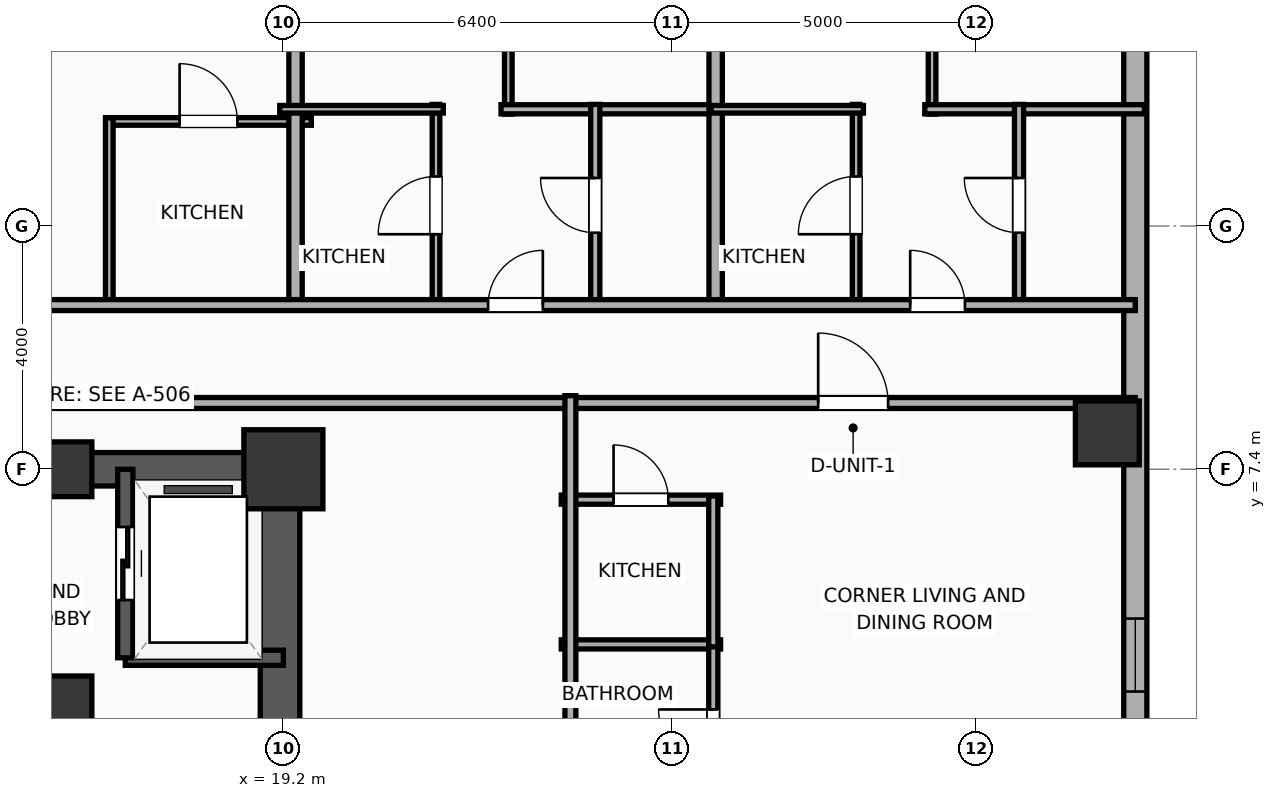
"""IFC4 building model, lengths in metres.
Left out: names, types, materials, properties, quantities, classifications, styles, units other than length and angle.
Written with IfcOpenShell. Run it as: python <this file> out.ifc"""

import sys

from ifc_helpers import new_model, si_unit, direction, frame, frame_2d, origin, origin_2d, place, context, subcontext, project, spatial, rectangle, hollow_rectangle, extrude, element, fill, save


model = new_model("IFC4")
c1 = context("Model", 3, precision=1e-05, world=origin(), true_north=direction((0.0, 1.0)))
c2 = subcontext(c1, "Body", "Model", "MODEL_VIEW")
j1 = project(units=[si_unit("LENGTHUNIT", "METRE"), si_unit("PLANEANGLEUNIT", "RADIAN")], contexts=[c1])
p1 = place(None, origin())
s1 = spatial("IfcSite", under=j1, at=p1, CompositionType="ELEMENT")
p2 = place(p1, origin())
s2 = spatial("IfcBuilding", under=s1, at=p2, CompositionType="ELEMENT")
p3 = place(p2, frame((0.0, 0.0, 101.4)))
s3 = spatial("IfcBuildingStorey", under=s2, at=p3, CompositionType="ELEMENT", Elevation=101.4)
for number, where, z_axis, x_axis in (
    (1, (15.6, 3.55, 0.0), (0.0, 0.0, 1.0), (1.0, 0.0, 0.0)),
    (2, (15.6, 7.4, 0.0), (0.0, 0.0, 1.0), (1.0, 0.0, 0.0)),
):
    element("IfcColumn", number, at=place(p3, frame(where, z_axis=z_axis, x_axis=x_axis)), inside=s3, PredefinedType="COLUMN", context=c2, shape_type="SweptSolid", body=[
        extrude(rectangle(XDim=0.9, YDim=0.9, at=origin_2d()), origin(), (0.0, 0.0, 1.0), 3.9),
    ])
p4 = place(p3, frame((19.2, 7.4, 0.0), z_axis=(0.0, 0.0, 1.0), x_axis=(1.0, 0.0, 0.0)))
e3 = element("IfcColumn", 3, at=p4, inside=s3, PredefinedType="COLUMN", context=c2, shape_type="SweptSolid", body=[
    extrude(rectangle(XDim=1.3, YDim=1.3, at=origin_2d()), origin(), (0.0, 0.0, 1.0), 3.9),
])
p5 = place(p3, frame((12.125, 7.4, 0.0), z_axis=(0.0, 0.0, 1.0), x_axis=(1.0, 0.0, 0.0)))
e4 = element("IfcWall", 4, at=p5, inside=s3, PredefinedType="SHEAR", context=c2, shape_type="SweptSolid", body=[
    extrude(rectangle(XDim=7.35, YDim=0.55, at=frame_2d((3.675, 0.0))), origin(), (0.0, 0.0, 1.0), 3.65),
])
p6 = place(p3, frame((19.145, -7.4, 0.0), z_axis=(0.0, 0.0, 1.0), x_axis=(0.0, 1.0, 0.0)))
e5 = element("IfcWall", 5, at=p6, inside=s3, PredefinedType="SHEAR", context=c2, shape_type="SweptSolid", body=[
    extrude(rectangle(XDim=14.8, YDim=0.65, at=frame_2d((7.4, 0.0))), origin(), (0.0, 0.0, 1.0), 3.65),
])
p7 = place(p3, frame((32.75, 7.998, 0.0), z_axis=(0.0, 0.0, 1.0), x_axis=(1.0, 0.0, 0.0)))
e6 = element("IfcColumn", 6, at=p7, inside=s3, PredefinedType="COLUMN", context=c2, shape_type="SweptSolid", body=[
    extrude(hollow_rectangle(XDim=1.05, YDim=1.05, WallThickness=0.036, at=origin_2d()), origin(), (0.0, 0.0, 1.0), 3.9),
])
p8 = place(p3, frame((33.21, 17.781, 0.0), z_axis=(0.0, 0.0, 1.0), x_axis=(0.0, -1.0, 0.0)))
e7 = element("IfcWall", 7, at=p8, inside=s3, PredefinedType="ELEMENTEDWALL", context=c2, shape_type="SweptSolid", body=[
    extrude(rectangle(XDim=34.363, YDim=0.38, at=frame_2d((17.181, 0.0))), origin(), (0.0, 0.0, 1.0), 3.65),
])
p9 = place(p8, frame((12.836, 0.0, 0.75)))
e8 = element("IfcOpeningElement", 8, at=p9, cuts=e7, PredefinedType="OPENING", context=c2, shape_type="SweptSolid", body=[
    extrude(rectangle(XDim=1.2, YDim=2.05, at=frame_2d((0.6, 1.025))), frame((0.0, 0.2, 0.0), z_axis=(0.0, -1.0, 0.0), x_axis=(1.0, 0.0, 0.0)), (0.0, 0.0, 1.0), 0.4),
])
p10 = place(p8, frame((21.386, 0.0, 0.75)))
e9 = element("IfcOpeningElement", 9, at=p10, cuts=e7, PredefinedType="OPENING", context=c2, shape_type="SweptSolid", body=[
    extrude(rectangle(XDim=1.2, YDim=2.05, at=frame_2d((0.6, 1.025))), frame((0.0, 0.2, 0.0), z_axis=(0.0, -1.0, 0.0), x_axis=(1.0, 0.0, 0.0)), (0.0, 0.0, 1.0), 0.4),
])
p11 = place(p3, frame((16.6, 4.3, 0.0), z_axis=(0.0, 0.0, 1.0), x_axis=(1.0, 0.0, 0.0)))
e10 = element("IfcWall", 10, at=p11, inside=s3, PredefinedType="SOLIDWALL", context=c2, shape_type="SweptSolid", body=[
    extrude(rectangle(XDim=2.6, YDim=0.25, at=frame_2d((1.3, 0.0))), origin(), (0.0, 0.0, 1.0), 3.65),
])
p12 = place(p3, frame((16.6, 7.4, 0.0), z_axis=(0.0, 0.0, 1.0), x_axis=(0.0, -1.0, 0.0)))
e11 = element("IfcWall", 11, at=p12, inside=s3, PredefinedType="SOLIDWALL", context=c2, shape_type="SweptSolid", body=[
    extrude(rectangle(XDim=3.1, YDim=0.25, at=frame_2d((1.55, 0.0))), origin(), (0.0, 0.0, 1.0), 3.65),
])
p13 = place(p12, frame((0.95, 0.0, 0.0)))
e12 = element("IfcOpeningElement", 12, at=p13, cuts=e11, PredefinedType="OPENING", context=c2, shape_type="SweptSolid", body=[
    extrude(rectangle(XDim=1.2, YDim=2.05, at=frame_2d((0.6, 1.025))), frame((0.0, 0.135, 0.0), z_axis=(0.0, -1.0, 0.0), x_axis=(1.0, 0.0, 0.0)), (0.0, 0.0, 1.0), 0.27),
])
p14 = place(p3, frame((9.88, 8.49, 0.0), z_axis=(0.0, 0.0, 1.0), x_axis=(1.0, 0.0, 0.0)))
e13 = element("IfcWall", 13, at=p14, inside=s3, PredefinedType="PARTITIONING", context=c2, shape_type="SweptSolid", body=[
    extrude(rectangle(XDim=23.33, YDim=0.18, at=frame_2d((11.665, 0.0))), origin(), (0.0, 0.0, 1.0), 3.65),
])
p15 = place(p14, frame((18.115, 0.0, 0.0)))
e14 = element("IfcOpeningElement", 14, at=p15, cuts=e13, PredefinedType="OPENING", context=c2, shape_type="SweptSolid", body=[
    extrude(rectangle(XDim=1.15, YDim=2.05, at=frame_2d((0.575, 1.025))), frame((0.0, 0.1, 0.0), z_axis=(0.0, -1.0, 0.0), x_axis=(1.0, 0.0, 0.0)), (0.0, 0.0, 1.0), 0.2),
])
p16 = place(p3, frame((16.277, 13.12, 0.0), z_axis=(0.0, 0.0, 1.0), x_axis=(1.0, 0.0, 0.0)))
e15 = element("IfcWall", 15, at=p16, inside=s3, PredefinedType="PARTITIONING", context=c2, shape_type="SweptSolid", body=[
    extrude(rectangle(XDim=3.383, YDim=0.125, at=frame_2d((1.691, 0.0))), origin(), (0.0, 0.0, 1.0), 3.65),
])
p17 = place(p16, frame((1.217, 0.0, 0.0)))
e16 = element("IfcOpeningElement", 16, at=p17, cuts=e15, PredefinedType="OPENING", context=c2, shape_type="SweptSolid", body=[
    extrude(rectangle(XDim=0.95, YDim=2.05, at=frame_2d((0.475, 1.025))), frame((0.0, 0.073, 0.0), z_axis=(0.0, -1.0, 0.0), x_axis=(1.0, 0.0, 0.0)), (0.0, 0.0, 1.0), 0.145),
])
p18 = place(p3, frame((16.337, 10.08, 0.0), z_axis=(0.0, 0.0, 1.0), x_axis=(0.0, 1.0, 0.0)))
e17 = element("IfcWall", 17, at=p18, inside=s3, PredefinedType="PARTITIONING", context=c2, shape_type="SweptSolid", body=[
    extrude(rectangle(XDim=3.1, YDim=0.125, at=frame_2d((1.55, 0.0))), origin(), (0.0, 0.0, 1.0), 3.65),
])
p19 = place(p3, frame((19.4, 10.02, 0.0), z_axis=(0.0, 0.0, 1.0), x_axis=(0.0, 1.0, 0.0)))
e18 = element("IfcWall", 18, at=p19, inside=s3, PredefinedType="PARTITIONING", context=c2, shape_type="SweptSolid", body=[
    extrude(rectangle(XDim=11.59, YDim=0.22, at=frame_2d((5.795, 0.0))), origin(), (0.0, 0.0, 1.0), 3.65),
])
p20 = place(p3, frame((22.899, 13.24, 0.0), z_axis=(0.0, 0.0, 1.0), x_axis=(0.0, 1.0, 0.0)))
e19 = element("IfcWall", 19, at=p20, inside=s3, PredefinedType="PARTITIONING", context=c2, shape_type="SweptSolid", body=[
    extrude(rectangle(XDim=8.52, YDim=0.125, at=frame_2d((4.26, 0.0))), origin(), (0.0, 0.0, 1.0), 3.65),
])
p21 = place(p20, frame((1.595, 0.0, 0.0)))
e20 = element("IfcOpeningElement", 20, at=p21, cuts=e19, PredefinedType="OPENING", context=c2, shape_type="SweptSolid", body=[
    extrude(rectangle(XDim=0.9, YDim=2.05, at=frame_2d((0.45, 1.025))), frame((0.0, 0.073, 0.0), z_axis=(0.0, -1.0, 0.0), x_axis=(1.0, 0.0, 0.0)), (0.0, 0.0, 1.0), 0.145),
])
p22 = place(p3, frame((22.779, 13.32, 0.0), z_axis=(0.0, 0.0, 1.0), x_axis=(1.0, 0.0, 0.0)))
e21 = element("IfcWall", 21, at=p22, inside=s3, PredefinedType="PLUMBINGWALL", context=c2, shape_type="SweptSolid", body=[
    extrude(rectangle(XDim=3.605, YDim=0.15, at=frame_2d((1.802, 0.0))), origin(), (0.0, 0.0, 1.0), 3.65),
])
p23 = place(p3, frame((21.71, 10.08, 0.0), z_axis=(0.0, 0.0, 1.0), x_axis=(0.0, 1.0, 0.0)))
e22 = element("IfcWall", 22, at=p23, inside=s3, PredefinedType="PARTITIONING", context=c2, shape_type="SweptSolid", body=[
    extrude(rectangle(XDim=3.32, YDim=0.125, at=frame_2d((1.66, 0.0))), origin(), (0.0, 0.0, 1.0), 3.65),
])
p24 = place(p23, frame((1.185, 0.0, 0.0)))
e23 = element("IfcOpeningElement", 23, at=p24, cuts=e22, PredefinedType="OPENING", context=c2, shape_type="SweptSolid", body=[
    extrude(rectangle(XDim=0.95, YDim=2.05, at=frame_2d((0.475, 1.025))), frame((0.0, 0.073, 0.0), z_axis=(0.0, -1.0, 0.0), x_axis=(1.0, 0.0, 0.0)), (0.0, 0.0, 1.0), 0.145),
])
p25 = place(p3, frame((19.14, 13.32, 0.0), z_axis=(0.0, 0.0, 1.0), x_axis=(1.0, 0.0, 0.0)))
e24 = element("IfcWall", 24, at=p25, inside=s3, PredefinedType="PARTITIONING", context=c2, shape_type="SweptSolid", body=[
    extrude(rectangle(XDim=2.69, YDim=0.125, at=frame_2d((1.345, 0.0))), origin(), (0.0, 0.0, 1.0), 3.65),
])
p26 = place(p3, frame((24.329, 10.08, 0.0), z_axis=(0.0, 0.0, 1.0), x_axis=(0.0, 1.0, 0.0)))
e25 = element("IfcWall", 25, at=p26, inside=s3, PredefinedType="PLUMBINGWALL", context=c2, shape_type="SweptSolid", body=[
    extrude(rectangle(XDim=3.32, YDim=0.15, at=frame_2d((1.66, 0.0))), origin(), (0.0, 0.0, 1.0), 3.65),
])
p27 = place(p26, frame((1.21, 0.0, 0.0)))
e26 = element("IfcOpeningElement", 26, at=p27, cuts=e25, PredefinedType="OPENING", context=c2, shape_type="SweptSolid", body=[
    extrude(rectangle(XDim=0.9, YDim=2.05, at=frame_2d((0.45, 1.025))), frame((0.0, 0.085, 0.0), z_axis=(0.0, -1.0, 0.0), x_axis=(1.0, 0.0, 0.0)), (0.0, 0.0, 1.0), 0.17),
])
p28 = place(p3, frame((26.309, 10.02, 0.0), z_axis=(0.0, 0.0, 1.0), x_axis=(0.0, 1.0, 0.0)))
e27 = element("IfcWall", 27, at=p28, inside=s3, PredefinedType="PARTITIONING", context=c2, shape_type="SweptSolid", body=[
    extrude(rectangle(XDim=11.59, YDim=0.22, at=frame_2d((5.795, 0.0))), origin(), (0.0, 0.0, 1.0), 3.65),
])
p29 = place(p3, frame((29.868, 13.24, 0.0), z_axis=(0.0, 0.0, 1.0), x_axis=(0.0, 1.0, 0.0)))
e28 = element("IfcWall", 28, at=p29, inside=s3, PredefinedType="PARTITIONING", context=c2, shape_type="SweptSolid", body=[
    extrude(rectangle(XDim=8.426, YDim=0.125, at=frame_2d((4.213, 0.0))), origin(), (0.0, 0.0, 1.0), 3.65),
])
p30 = place(p29, frame((1.572, 0.0, 0.0)))
e29 = element("IfcOpeningElement", 29, at=p30, cuts=e28, PredefinedType="OPENING", context=c2, shape_type="SweptSolid", body=[
    extrude(rectangle(XDim=0.9, YDim=2.05, at=frame_2d((0.45, 1.025))), frame((0.0, 0.073, 0.0), z_axis=(0.0, -1.0, 0.0), x_axis=(1.0, 0.0, 0.0)), (0.0, 0.0, 1.0), 0.145),
])
p31 = place(p3, frame((29.748, 13.32, 0.0), z_axis=(0.0, 0.0, 1.0), x_axis=(1.0, 0.0, 0.0)))
e30 = element("IfcWall", 30, at=p31, inside=s3, PredefinedType="PLUMBINGWALL", context=c2, shape_type="SweptSolid", body=[
    extrude(rectangle(XDim=3.612, YDim=0.15, at=frame_2d((1.806, 0.0))), origin(), (0.0, 0.0, 1.0), 3.65),
])
p32 = place(p3, frame((28.619, 10.08, 0.0), z_axis=(0.0, 0.0, 1.0), x_axis=(0.0, 1.0, 0.0)))
e31 = element("IfcWall", 31, at=p32, inside=s3, PredefinedType="PARTITIONING", context=c2, shape_type="SweptSolid", body=[
    extrude(rectangle(XDim=3.32, YDim=0.125, at=frame_2d((1.66, 0.0))), origin(), (0.0, 0.0, 1.0), 3.65),
])
p33 = place(p32, frame((1.185, 0.0, 0.0)))
e32 = element("IfcOpeningElement", 32, at=p33, cuts=e31, PredefinedType="OPENING", context=c2, shape_type="SweptSolid", body=[
    extrude(rectangle(XDim=0.95, YDim=2.05, at=frame_2d((0.475, 1.025))), frame((0.0, 0.073, 0.0), z_axis=(0.0, -1.0, 0.0), x_axis=(1.0, 0.0, 0.0)), (0.0, 0.0, 1.0), 0.145),
])
p34 = place(p3, frame((26.234, 13.32, 0.0), z_axis=(0.0, 0.0, 1.0), x_axis=(1.0, 0.0, 0.0)))
e33 = element("IfcWall", 33, at=p34, inside=s3, PredefinedType="PARTITIONING", context=c2, shape_type="SweptSolid", body=[
    extrude(rectangle(XDim=2.505, YDim=0.125, at=frame_2d((1.252, 0.0))), origin(), (0.0, 0.0, 1.0), 3.65),
])
p35 = place(p3, frame((31.298, 10.08, 0.0), z_axis=(0.0, 0.0, 1.0), x_axis=(0.0, 1.0, 0.0)))
e34 = element("IfcWall", 34, at=p35, inside=s3, PredefinedType="PLUMBINGWALL", context=c2, shape_type="SweptSolid", body=[
    extrude(rectangle(XDim=3.32, YDim=0.15, at=frame_2d((1.66, 0.0))), origin(), (0.0, 0.0, 1.0), 3.65),
])
p36 = place(p35, frame((1.21, 0.0, 0.0)))
e35 = element("IfcOpeningElement", 35, at=p36, cuts=e34, PredefinedType="OPENING", context=c2, shape_type="SweptSolid", body=[
    extrude(rectangle(XDim=0.9, YDim=2.05, at=frame_2d((0.45, 1.025))), frame((0.0, 0.085, 0.0), z_axis=(0.0, -1.0, 0.0), x_axis=(1.0, 0.0, 0.0)), (0.0, 0.0, 1.0), 0.17),
])
p37 = place(p3, frame((-29.21, 10.1, 0.0), z_axis=(0.0, 0.0, 1.0), x_axis=(1.0, 0.0, 0.0)))
e36 = element("IfcWall", 36, at=p37, inside=s3, PredefinedType="PARTITIONING", context=c2, shape_type="SweptSolid", body=[
    extrude(rectangle(XDim=62.42, YDim=0.18, at=frame_2d((31.21, 0.0))), origin(), (0.0, 0.0, 1.0), 3.65),
])
p38 = place(p37, frame((4.906, 0.0, 0.0)))
e37 = element("IfcOpeningElement", 37, at=p38, cuts=e36, PredefinedType="OPENING", context=c2, shape_type="SweptSolid", body=[
    extrude(rectangle(XDim=1.15, YDim=2.05, at=frame_2d((0.575, 1.025))), frame((0.0, 0.1, 0.0), z_axis=(0.0, -1.0, 0.0), x_axis=(1.0, 0.0, 0.0)), (0.0, 0.0, 1.0), 0.2),
])
p39 = place(p37, frame((14.812, 0.0, 0.0)))
e38 = element("IfcOpeningElement", 38, at=p39, cuts=e36, PredefinedType="OPENING", context=c2, shape_type="SweptSolid", body=[
    extrude(rectangle(XDim=1.15, YDim=2.05, at=frame_2d((0.575, 1.025))), frame((0.0, 0.1, 0.0), z_axis=(0.0, -1.0, 0.0), x_axis=(1.0, 0.0, 0.0)), (0.0, 0.0, 1.0), 0.2),
])
p40 = place(p37, frame((24.406, 0.0, 0.0)))
e39 = element("IfcOpeningElement", 39, at=p40, cuts=e36, PredefinedType="OPENING", context=c2, shape_type="SweptSolid", body=[
    extrude(rectangle(XDim=1.15, YDim=2.05, at=frame_2d((0.575, 1.025))), frame((0.0, 0.1, 0.0), z_axis=(0.0, -1.0, 0.0), x_axis=(1.0, 0.0, 0.0)), (0.0, 0.0, 1.0), 0.2),
])
p41 = place(p37, frame((33.981, 0.0, 0.0)))
e40 = element("IfcOpeningElement", 40, at=p41, cuts=e36, PredefinedType="OPENING", context=c2, shape_type="SweptSolid", body=[
    extrude(rectangle(XDim=1.15, YDim=2.05, at=frame_2d((0.575, 1.025))), frame((0.0, 0.1, 0.0), z_axis=(0.0, -1.0, 0.0), x_axis=(1.0, 0.0, 0.0)), (0.0, 0.0, 1.0), 0.2),
])
p42 = place(p37, frame((43.138, 0.0, 0.0)))
e41 = element("IfcOpeningElement", 41, at=p42, cuts=e36, PredefinedType="OPENING", context=c2, shape_type="SweptSolid", body=[
    extrude(rectangle(XDim=1.15, YDim=2.05, at=frame_2d((0.575, 1.025))), frame((0.0, 0.1, 0.0), z_axis=(0.0, -1.0, 0.0), x_axis=(1.0, 0.0, 0.0)), (0.0, 0.0, 1.0), 0.2),
])
p43 = place(p37, frame((51.777, 0.0, 0.0)))
e42 = element("IfcOpeningElement", 42, at=p43, cuts=e36, PredefinedType="OPENING", context=c2, shape_type="SweptSolid", body=[
    extrude(rectangle(XDim=0.9, YDim=2.05, at=frame_2d((0.45, 1.025))), frame((0.0, 0.1, 0.0), z_axis=(0.0, -1.0, 0.0), x_axis=(1.0, 0.0, 0.0)), (0.0, 0.0, 1.0), 0.2),
])
p44 = place(p37, frame((58.718, 0.0, 0.0)))
e43 = element("IfcOpeningElement", 43, at=p44, cuts=e36, PredefinedType="OPENING", context=c2, shape_type="SweptSolid", body=[
    extrude(rectangle(XDim=0.9, YDim=2.05, at=frame_2d((0.45, 1.025))), frame((0.0, 0.1, 0.0), z_axis=(0.0, -1.0, 0.0), x_axis=(1.0, 0.0, 0.0)), (0.0, 0.0, 1.0), 0.2),
])
p45 = place(p3, frame((23.77, 6.9, 0.0), z_axis=(0.0, 0.0, 1.0), x_axis=(1.0, 0.0, 0.0)))
e44 = element("IfcWall", 44, at=p45, inside=s3, PredefinedType="PLUMBINGWALL", context=c2, shape_type="SweptSolid", body=[
    extrude(rectangle(XDim=2.62, YDim=0.15, at=frame_2d((1.31, 0.0))), origin(), (0.0, 0.0, 1.0), 3.65),
])
p46 = place(p45, frame((0.86, 0.0, 0.0)))
e45 = element("IfcOpeningElement", 45, at=p46, cuts=e44, PredefinedType="OPENING", context=c2, shape_type="SweptSolid", body=[
    extrude(rectangle(XDim=0.9, YDim=2.05, at=frame_2d((0.45, 1.025))), frame((0.0, 0.085, 0.0), z_axis=(0.0, -1.0, 0.0), x_axis=(1.0, 0.0, 0.0)), (0.0, 0.0, 1.0), 0.17),
])
p47 = place(p3, frame((23.77, 4.52, 0.0), z_axis=(0.0, 0.0, 1.0), x_axis=(1.0, 0.0, 0.0)))
e46 = element("IfcWall", 46, at=p47, inside=s3, PredefinedType="PLUMBINGWALL", context=c2, shape_type="SweptSolid", body=[
    extrude(rectangle(XDim=2.62, YDim=0.15, at=frame_2d((1.31, 0.0))), origin(), (0.0, 0.0, 1.0), 3.65),
])
p48 = place(p3, frame((26.27, 1.44, 0.0), z_axis=(0.0, 0.0, 1.0), x_axis=(0.0, 1.0, 0.0)))
e47 = element("IfcWall", 47, at=p48, inside=s3, PredefinedType="PLUMBINGWALL", context=c2, shape_type="SweptSolid", body=[
    extrude(rectangle(XDim=3.12, YDim=0.15, at=frame_2d((1.56, 0.0))), origin(), (0.0, 0.0, 1.0), 3.65),
])
p49 = place(p48, frame((1.11, 0.0, 0.0)))
e48 = element("IfcOpeningElement", 48, at=p49, cuts=e47, PredefinedType="OPENING", context=c2, shape_type="SweptSolid", body=[
    extrude(rectangle(XDim=0.9, YDim=2.05, at=frame_2d((0.45, 1.025))), frame((0.0, 0.085, 0.0), z_axis=(0.0, -1.0, 0.0), x_axis=(1.0, 0.0, 0.0)), (0.0, 0.0, 1.0), 0.17),
])
p50 = place(p3, frame((26.27, 4.48, 0.0), z_axis=(0.0, 0.0, 1.0), x_axis=(0.0, 1.0, 0.0)))
e49 = element("IfcWall", 49, at=p50, inside=s3, PredefinedType="PLUMBINGWALL", context=c2, shape_type="SweptSolid", body=[
    extrude(rectangle(XDim=2.48, YDim=0.15, at=frame_2d((1.24, 0.0))), origin(), (0.0, 0.0, 1.0), 3.65),
])
p51 = place(p3, frame((23.92, -8.61, 0.0), z_axis=(0.0, 0.0, 1.0), x_axis=(0.0, 1.0, 0.0)))
e50 = element("IfcWall", 50, at=p51, inside=s3, PredefinedType="PARTITIONING", context=c2, shape_type="SweptSolid", body=[
    extrude(rectangle(XDim=17.22, YDim=0.18, at=frame_2d((8.61, 0.0))), origin(), (0.0, 0.0, 1.0), 3.65),
])
p52 = place(p9, origin())
e51 = element("IfcWindow", 51, at=p52, inside=s3, PartitioningType="SINGLE_PANEL", PredefinedType="WINDOW", context=c2, shape_type="SweptSolid", body=[
    extrude(rectangle(XDim=1.2, YDim=2.05, at=frame_2d((0.6, 1.025))), frame((0.0, 0.03, 0.0), z_axis=(0.0, -1.0, 0.0), x_axis=(1.0, 0.0, 0.0)), (0.0, 0.0, 1.0), 0.06),
])
fill(e8, e51)
p53 = place(p13, origin())
e52 = element("IfcDoor", 52, at=p53, inside=s3, OperationType="SLIDING_TO_LEFT", PredefinedType="DOOR", context=c2, shape_type="SweptSolid", body=[
    extrude(rectangle(XDim=1.2, YDim=2.05, at=frame_2d((0.6, 1.025))), frame((0.0, 0.025, 0.0), z_axis=(0.0, -1.0, 0.0), x_axis=(1.0, 0.0, 0.0)), (0.0, 0.0, 1.0), 0.05),
])
fill(e12, e52)
p54 = place(p15, origin())
e53 = element("IfcDoor", 53, at=p54, inside=s3, OperationType="SINGLE_SWING_LEFT", PredefinedType="DOOR", context=c2, shape_type="SweptSolid", body=[
    extrude(rectangle(XDim=1.15, YDim=2.05, at=frame_2d((0.575, 1.025))), frame((0.0, 0.025, 0.0), z_axis=(0.0, -1.0, 0.0), x_axis=(1.0, 0.0, 0.0)), (0.0, 0.0, 1.0), 0.05),
])
fill(e14, e53)
p55 = place(p17, origin())
e54 = element("IfcDoor", 54, at=p55, inside=s3, OperationType="SINGLE_SWING_LEFT", PredefinedType="DOOR", context=c2, shape_type="SweptSolid", body=[
    extrude(rectangle(XDim=0.95, YDim=2.05, at=frame_2d((0.475, 1.025))), frame((0.0, 0.025, 0.0), z_axis=(0.0, -1.0, 0.0), x_axis=(1.0, 0.0, 0.0)), (0.0, 0.0, 1.0), 0.05),
])
fill(e16, e54)
p56 = place(p24, origin())
e55 = element("IfcDoor", 55, at=p56, inside=s3, OperationType="SINGLE_SWING_LEFT", PredefinedType="DOOR", context=c2, shape_type="SweptSolid", body=[
    extrude(rectangle(XDim=0.95, YDim=2.05, at=frame_2d((0.475, 1.025))), frame((0.0, 0.025, 0.0), z_axis=(0.0, -1.0, 0.0), x_axis=(1.0, 0.0, 0.0)), (0.0, 0.0, 1.0), 0.05),
])
fill(e23, e55)
p57 = place(p27, origin())
e56 = element("IfcDoor", 56, at=p57, inside=s3, OperationType="SINGLE_SWING_RIGHT", PredefinedType="DOOR", context=c2, shape_type="SweptSolid", body=[
    extrude(rectangle(XDim=0.9, YDim=2.05, at=frame_2d((0.45, 1.025))), frame((0.0, 0.025, 0.0), z_axis=(0.0, -1.0, 0.0), x_axis=(1.0, 0.0, 0.0)), (0.0, 0.0, 1.0), 0.05),
])
fill(e26, e56)
p58 = place(p33, origin())
e57 = element("IfcDoor", 57, at=p58, inside=s3, OperationType="SINGLE_SWING_LEFT", PredefinedType="DOOR", context=c2, shape_type="SweptSolid", body=[
    extrude(rectangle(XDim=0.95, YDim=2.05, at=frame_2d((0.475, 1.025))), frame((0.0, 0.025, 0.0), z_axis=(0.0, -1.0, 0.0), x_axis=(1.0, 0.0, 0.0)), (0.0, 0.0, 1.0), 0.05),
])
fill(e32, e57)
p59 = place(p36, origin())
e58 = element("IfcDoor", 58, at=p59, inside=s3, OperationType="SINGLE_SWING_RIGHT", PredefinedType="DOOR", context=c2, shape_type="SweptSolid", body=[
    extrude(rectangle(XDim=0.9, YDim=2.05, at=frame_2d((0.45, 1.025))), frame((0.0, 0.025, 0.0), z_axis=(0.0, -1.0, 0.0), x_axis=(1.0, 0.0, 0.0)), (0.0, 0.0, 1.0), 0.05),
])
fill(e35, e58)
p60 = place(p43, origin())
e59 = element("IfcDoor", 59, at=p60, inside=s3, OperationType="SINGLE_SWING_RIGHT", PredefinedType="DOOR", context=c2, shape_type="SweptSolid", body=[
    extrude(rectangle(XDim=0.9, YDim=2.05, at=frame_2d((0.45, 1.025))), frame((0.0, 0.025, 0.0), z_axis=(0.0, -1.0, 0.0), x_axis=(1.0, 0.0, 0.0)), (0.0, 0.0, 1.0), 0.05),
])
fill(e42, e59)
p61 = place(p44, origin())
e60 = element("IfcDoor", 60, at=p61, inside=s3, OperationType="SINGLE_SWING_LEFT", PredefinedType="DOOR", context=c2, shape_type="SweptSolid", body=[
    extrude(rectangle(XDim=0.9, YDim=2.05, at=frame_2d((0.45, 1.025))), frame((0.0, 0.025, 0.0), z_axis=(0.0, -1.0, 0.0), x_axis=(1.0, 0.0, 0.0)), (0.0, 0.0, 1.0), 0.05),
])
fill(e43, e60)
p62 = place(p46, origin())
e61 = element("IfcDoor", 61, at=p62, inside=s3, OperationType="SINGLE_SWING_LEFT", PredefinedType="DOOR", context=c2, shape_type="SweptSolid", body=[
    extrude(rectangle(XDim=0.9, YDim=2.05, at=frame_2d((0.45, 1.025))), frame((0.0, 0.025, 0.0), z_axis=(0.0, -1.0, 0.0), x_axis=(1.0, 0.0, 0.0)), (0.0, 0.0, 1.0), 0.05),
])
fill(e45, e61)
p63 = place(p49, origin())
e62 = element("IfcDoor", 62, at=p63, inside=s3, OperationType="SINGLE_SWING_RIGHT", PredefinedType="DOOR", context=c2, shape_type="SweptSolid", body=[
    extrude(rectangle(XDim=0.9, YDim=2.05, at=frame_2d((0.45, 1.025))), frame((0.0, 0.025, 0.0), z_axis=(0.0, -1.0, 0.0), x_axis=(1.0, 0.0, 0.0)), (0.0, 0.0, 1.0), 0.05),
])
fill(e48, e62)
save(model, sys.argv[1])
